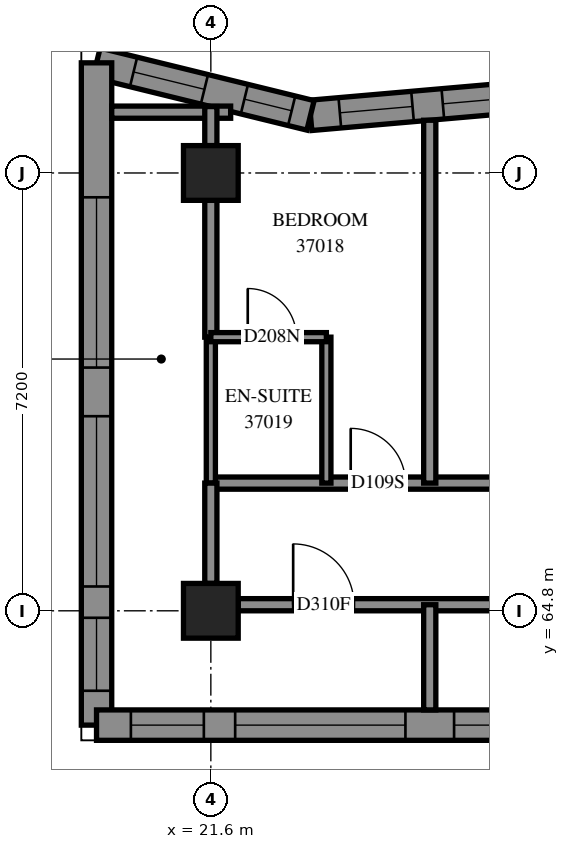
"""IFC4 building model, lengths in metres.
Left out: names, types, materials, properties, quantities, classifications, styles, units other than length and angle.
Written with IfcOpenShell. Run it as: python <this file> out.ifc"""

import sys

from ifc_helpers import new_model, si_unit, direction, frame, frame_2d, origin, origin_2d, place, context, subcontext, project, spatial, polyline, rectangle, outline, extrude, element, fill, save


model = new_model("IFC4")
c1 = context("Model", 3, precision=1e-05, world=origin(), true_north=direction((0.0, 1.0)))
c2 = subcontext(c1, "Body", "Model", "MODEL_VIEW")
j1 = project(units=[si_unit("LENGTHUNIT", "METRE"), si_unit("PLANEANGLEUNIT", "RADIAN")], contexts=[c1])
p1 = place(None, origin())
s1 = spatial("IfcSite", under=j1, at=p1, CompositionType="ELEMENT")
p2 = place(p1, origin())
s2 = spatial("IfcBuilding", under=s1, at=p2, CompositionType="ELEMENT")
p3 = place(p2, frame((0.0, 0.0, 138.8)))
s3 = spatial("IfcBuildingStorey", under=s2, at=p3, CompositionType="ELEMENT", Elevation=138.8)
for number, where, z_axis, x_axis in (
    (1, (21.6, 64.8, 0.0), (0.0, 0.0, 1.0), (1.0, 0.0, 0.0)),
    (2, (21.6, 72.0, 0.0), (0.0, 0.0, 1.0), (1.0, 0.0, 0.0)),
):
    element("IfcColumn", number, at=place(p3, frame(where, z_axis=z_axis, x_axis=x_axis)), inside=s3, PredefinedType="COLUMN", context=c2, shape_type="SweptSolid", body=[
        extrude(rectangle(XDim=0.9, YDim=0.9, at=origin_2d()), origin(), (0.0, 0.0, 1.0), 3.1),
    ])
p4 = place(p3, frame((27.047, 73.279, 0.0), z_axis=(0.0, 0.0, 1.0), x_axis=(-0.9962271263, -0.0867842891, 0.0)))
e3 = element("IfcWall", 3, at=p4, inside=s3, PredefinedType="SOLIDWALL", context=c2, shape_type="SweptSolid", body=[
    extrude(outline(polyline([(-0.022, -0.25), (3.781, -0.25), (3.864, 0.25), (0.022, 0.25), (-0.022, -0.25)])), origin(), (0.0, 0.0, 1.0), 3.1),
])
p5 = place(p4, frame((0.438, 0.0, 0.45)))
e4 = element("IfcOpeningElement", 4, at=p5, cuts=e3, PredefinedType="OPENING", context=c2, shape_type="SweptSolid", body=[
    extrude(rectangle(XDim=1.2, YDim=2.5, at=frame_2d((0.6, 1.25))), frame((0.0, 0.26, 0.0), z_axis=(0.0, -1.0, 0.0), x_axis=(1.0, 0.0, 0.0)), (0.0, 0.0, 1.0), 0.52),
])
p6 = place(p4, frame((2.138, 0.0, 0.45)))
e5 = element("IfcOpeningElement", 5, at=p6, cuts=e3, PredefinedType="OPENING", context=c2, shape_type="SweptSolid", body=[
    extrude(rectangle(XDim=1.2, YDim=2.5, at=frame_2d((0.6, 1.25))), frame((0.0, 0.26, 0.0), z_axis=(0.0, -1.0, 0.0), x_axis=(1.0, 0.0, 0.0)), (0.0, 0.0, 1.0), 0.52),
])
p7 = place(p3, frame((23.239, 72.947, 0.0), z_axis=(0.0, 0.0, 1.0), x_axis=(-0.9711662492, 0.2384032642, 0.0)))
e6 = element("IfcWall", 6, at=p7, inside=s3, PredefinedType="SOLIDWALL", context=c2, shape_type="SweptSolid", body=[
    extrude(outline(polyline([(0.041, -0.25), (3.942, -0.25), (3.304, 0.25), (-0.041, 0.25), (0.041, -0.25)])), origin(), (0.0, 0.0, 1.0), 3.1),
])
p8 = place(p7, frame((1.796, 0.0, 0.45)))
e7 = element("IfcOpeningElement", 7, at=p8, cuts=e6, PredefinedType="OPENING", context=c2, shape_type="SweptSolid", body=[
    extrude(rectangle(XDim=1.2, YDim=2.5, at=frame_2d((0.6, 1.25))), frame((0.0, 0.26, 0.0), z_axis=(0.0, -1.0, 0.0), x_axis=(1.0, 0.0, 0.0)), (0.0, 0.0, 1.0), 0.52),
])
p9 = place(p7, frame((0.319, 0.0, 0.45)))
e8 = element("IfcOpeningElement", 8, at=p9, cuts=e6, PredefinedType="OPENING", context=c2, shape_type="SweptSolid", body=[
    extrude(rectangle(XDim=0.8, YDim=2.5, at=frame_2d((0.4, 1.25))), frame((0.0, 0.26, 0.0), z_axis=(0.0, -1.0, 0.0), x_axis=(1.0, 0.0, 0.0)), (0.0, 0.0, 1.0), 0.52),
])
p10 = place(p3, frame((19.72, 73.811, 0.0), z_axis=(0.0, 0.0, 1.0), x_axis=(0.0, -1.0, 0.0)))
e9 = element("IfcWall", 9, at=p10, inside=s3, PredefinedType="SOLIDWALL", context=c2, shape_type="SweptSolid", body=[
    extrude(outline(polyline([(-0.319, -0.25), (11.141, -0.25), (10.641, 0.25), (0.319, 0.25), (-0.319, -0.25)])), origin(), (0.0, 0.0, 1.0), 3.1),
])
p11 = place(p10, frame((2.211, 0.0, 0.45)))
e10 = element("IfcOpeningElement", 10, at=p11, cuts=e9, PredefinedType="OPENING", context=c2, shape_type="SweptSolid", body=[
    extrude(rectangle(XDim=2.8, YDim=2.5, at=frame_2d((1.4, 1.25))), frame((0.0, 0.26, 0.0), z_axis=(0.0, -1.0, 0.0), x_axis=(1.0, 0.0, 0.0)), (0.0, 0.0, 1.0), 0.52),
])
p12 = place(p10, frame((5.811, 0.0, 0.45)))
e11 = element("IfcOpeningElement", 11, at=p12, cuts=e9, PredefinedType="OPENING", context=c2, shape_type="SweptSolid", body=[
    extrude(rectangle(XDim=2.8, YDim=2.5, at=frame_2d((1.4, 1.25))), frame((0.0, 0.26, 0.0), z_axis=(0.0, -1.0, 0.0), x_axis=(1.0, 0.0, 0.0)), (0.0, 0.0, 1.0), 0.52),
])
p13 = place(p10, frame((9.126, 0.0, 0.45)))
e12 = element("IfcOpeningElement", 12, at=p13, cuts=e9, PredefinedType="OPENING", context=c2, shape_type="SweptSolid", body=[
    extrude(rectangle(XDim=1.2, YDim=2.5, at=frame_2d((0.6, 1.25))), frame((0.0, 0.26, 0.0), z_axis=(0.0, -1.0, 0.0), x_axis=(1.0, 0.0, 0.0)), (0.0, 0.0, 1.0), 0.52),
])
p14 = place(p3, frame((19.72, 62.92, 0.0), z_axis=(0.0, 0.0, 1.0), x_axis=(1.0, 0.0, 0.0)))
e13 = element("IfcWall", 13, at=p14, inside=s3, PredefinedType="SOLIDWALL", context=c2, shape_type="SweptSolid", body=[
    extrude(outline(polyline([(-0.25, -0.25), (15.08, -0.25), (15.58, 0.25), (0.25, 0.25), (-0.25, -0.25)])), origin(), (0.0, 0.0, 1.0), 3.1),
])
p15 = place(p14, frame((2.28, 0.0, 0.45)))
e14 = element("IfcOpeningElement", 14, at=p15, cuts=e13, PredefinedType="OPENING", context=c2, shape_type="SweptSolid", body=[
    extrude(rectangle(XDim=2.8, YDim=2.5, at=frame_2d((1.4, 1.25))), frame((0.0, 0.26, 0.0), z_axis=(0.0, -1.0, 0.0), x_axis=(1.0, 0.0, 0.0)), (0.0, 0.0, 1.0), 0.52),
])
p16 = place(p14, frame((5.88, 0.0, 0.45)))
e15 = element("IfcOpeningElement", 15, at=p16, cuts=e13, PredefinedType="OPENING", context=c2, shape_type="SweptSolid", body=[
    extrude(rectangle(XDim=2.8, YDim=2.5, at=frame_2d((1.4, 1.25))), frame((0.0, 0.26, 0.0), z_axis=(0.0, -1.0, 0.0), x_axis=(1.0, 0.0, 0.0)), (0.0, 0.0, 1.0), 0.52),
])
p17 = place(p14, frame((9.23, 0.0, 0.45)))
e16 = element("IfcOpeningElement", 16, at=p17, cuts=e13, PredefinedType="OPENING", context=c2, shape_type="SweptSolid", body=[
    extrude(rectangle(XDim=2.8, YDim=2.5, at=frame_2d((1.4, 1.25))), frame((0.0, 0.26, 0.0), z_axis=(0.0, -1.0, 0.0), x_axis=(1.0, 0.0, 0.0)), (0.0, 0.0, 1.0), 0.52),
])
p18 = place(p14, frame((0.565, 0.0, 0.45)))
e17 = element("IfcOpeningElement", 17, at=p18, cuts=e13, PredefinedType="OPENING", context=c2, shape_type="SweptSolid", body=[
    extrude(rectangle(XDim=1.2, YDim=2.5, at=frame_2d((0.6, 1.25))), frame((0.0, 0.26, 0.0), z_axis=(0.0, -1.0, 0.0), x_axis=(1.0, 0.0, 0.0)), (0.0, 0.0, 1.0), 0.52),
])
p19 = place(p14, frame((13.305, 0.0, 0.45)))
e18 = element("IfcOpeningElement", 18, at=p19, cuts=e13, PredefinedType="OPENING", context=c2, shape_type="SweptSolid", body=[
    extrude(rectangle(XDim=1.2, YDim=2.5, at=frame_2d((0.6, 1.25))), frame((0.0, 0.26, 0.0), z_axis=(0.0, -1.0, 0.0), x_axis=(1.0, 0.0, 0.0)), (0.0, 0.0, 1.0), 0.52),
])
p20 = place(p3, frame((21.6, 66.9, 0.0), z_axis=(0.0, 0.0, 1.0), x_axis=(1.0, 0.0, 0.0)))
e19 = element("IfcWall", 19, at=p20, inside=s3, PredefinedType="PARTITIONING", context=c2, shape_type="SweptSolid", body=[
    extrude(rectangle(XDim=19.0, YDim=0.2, at=frame_2d((9.5, 0.0))), origin(), (0.0, 0.0, 1.0), 3.1),
])
p21 = place(p20, frame((2.3, 0.0, 0.0)))
e20 = element("IfcOpeningElement", 20, at=p21, cuts=e19, PredefinedType="OPENING", context=c2, shape_type="SweptSolid", body=[
    extrude(rectangle(XDim=0.9, YDim=2.1, at=frame_2d((0.45, 1.05))), frame((0.0, 0.11, 0.0), z_axis=(0.0, -1.0, 0.0), x_axis=(1.0, 0.0, 0.0)), (0.0, 0.0, 1.0), 0.22),
])
p22 = place(p20, frame((5.957, 0.0, 0.0)))
e21 = element("IfcOpeningElement", 21, at=p22, cuts=e19, PredefinedType="OPENING", context=c2, shape_type="SweptSolid", body=[
    extrude(rectangle(XDim=0.9, YDim=2.1, at=frame_2d((0.45, 1.05))), frame((0.0, 0.11, 0.0), z_axis=(0.0, -1.0, 0.0), x_axis=(1.0, 0.0, 0.0)), (0.0, 0.0, 1.0), 0.22),
])
p23 = place(p20, frame((13.057, 0.0, 0.0)))
e22 = element("IfcOpeningElement", 22, at=p23, cuts=e19, PredefinedType="OPENING", context=c2, shape_type="SweptSolid", body=[
    extrude(rectangle(XDim=0.9, YDim=2.1, at=frame_2d((0.45, 1.05))), frame((0.0, 0.11, 0.0), z_axis=(0.0, -1.0, 0.0), x_axis=(1.0, 0.0, 0.0)), (0.0, 0.0, 1.0), 0.22),
])
p24 = place(p3, frame((22.05, 64.9, 0.0), z_axis=(0.0, 0.0, 1.0), x_axis=(1.0, 0.0, 0.0)))
e23 = element("IfcWall", 23, at=p24, inside=s3, PredefinedType="PARTITIONING", context=c2, shape_type="SweptSolid", body=[
    extrude(rectangle(XDim=6.3, YDim=0.2, at=frame_2d((3.15, 0.0))), origin(), (0.0, 0.0, 1.0), 2.6),
])
p25 = place(p24, frame((0.904, 0.0, 0.0)))
e24 = element("IfcOpeningElement", 24, at=p25, cuts=e23, PredefinedType="OPENING", context=c2, shape_type="SweptSolid", body=[
    extrude(rectangle(XDim=1.0, YDim=2.1, at=frame_2d((0.5, 1.05))), frame((0.0, 0.11, 0.0), z_axis=(0.0, -1.0, 0.0), x_axis=(1.0, 0.0, 0.0)), (0.0, 0.0, 1.0), 0.22),
])
p26 = place(p3, frame((25.2, 66.9, 0.0), z_axis=(0.0, 0.0, 1.0), x_axis=(0.0, 1.0, 0.0)))
e25 = element("IfcWall", 25, at=p26, inside=s3, PredefinedType="PARTITIONING", context=c2, shape_type="SweptSolid", body=[
    extrude(rectangle(XDim=5.967, YDim=0.2, at=frame_2d((2.984, 0.0))), origin(), (0.0, 0.0, 1.0), 3.1),
])
p27 = place(p3, frame((21.6, 66.9, 0.0), z_axis=(0.0, 0.0, 1.0), x_axis=(0.0, 1.0, 0.0)))
e26 = element("IfcWall", 26, at=p27, inside=s3, PredefinedType="PARTITIONING", context=c2, shape_type="SweptSolid", body=[
    extrude(rectangle(XDim=2.4, YDim=0.15, at=frame_2d((1.2, 0.0))), origin(), (0.0, 0.0, 1.0), 2.6),
])
p28 = place(p3, frame((23.5, 66.9, 0.0), z_axis=(0.0, 0.0, 1.0), x_axis=(0.0, 1.0, 0.0)))
e27 = element("IfcWall", 27, at=p28, inside=s3, PredefinedType="PARTITIONING", context=c2, shape_type="SweptSolid", body=[
    extrude(rectangle(XDim=2.4, YDim=0.15, at=frame_2d((1.2, 0.0))), origin(), (0.0, 0.0, 1.0), 3.1),
])
p29 = place(p3, frame((21.6, 69.3, 0.0), z_axis=(0.0, 0.0, 1.0), x_axis=(0.0, 1.0, 0.0)))
e28 = element("IfcWall", 28, at=p29, inside=s3, PredefinedType="PARTITIONING", context=c2, shape_type="SweptSolid", body=[
    extrude(rectangle(XDim=2.25, YDim=0.2, at=frame_2d((1.125, 0.0))), origin(), (0.0, 0.0, 1.0), 2.6),
])
p30 = place(p3, frame((19.97, 73.0, 0.0), z_axis=(0.0, 0.0, 1.0), x_axis=(1.0, 0.0, 0.0)))
e29 = element("IfcWall", 29, at=p30, inside=s3, PredefinedType="PARTITIONING", context=c2, shape_type="SweptSolid", body=[
    extrude(rectangle(XDim=1.956, YDim=0.2, at=frame_2d((0.978, 0.0))), origin(), (0.0, 0.0, 1.0), 3.1),
])
p31 = place(p3, frame((21.6, 69.3, 0.0), z_axis=(0.0, 0.0, 1.0), x_axis=(1.0, 0.0, 0.0)))
e30 = element("IfcWall", 30, at=p31, inside=s3, PredefinedType="PARTITIONING", context=c2, shape_type="SweptSolid", body=[
    extrude(rectangle(XDim=1.9, YDim=0.15, at=frame_2d((0.95, 0.0))), origin(), (0.0, 0.0, 1.0), 3.1),
])
p32 = place(p31, frame((0.607, 0.0, 0.0)))
e31 = element("IfcOpeningElement", 31, at=p32, cuts=e30, PredefinedType="OPENING", context=c2, shape_type="SweptSolid", body=[
    extrude(rectangle(XDim=0.8, YDim=2.1, at=frame_2d((0.4, 1.05))), frame((0.0, 0.085, 0.0), z_axis=(0.0, -1.0, 0.0), x_axis=(1.0, 0.0, 0.0)), (0.0, 0.0, 1.0), 0.17),
])
p33 = place(p3, frame((25.2, 63.17, 0.0), z_axis=(0.0, 0.0, 1.0), x_axis=(0.0, 1.0, 0.0)))
e32 = element("IfcWall", 32, at=p33, inside=s3, PredefinedType="PARTITIONING", context=c2, shape_type="SweptSolid", body=[
    extrude(rectangle(XDim=1.73, YDim=0.2, at=frame_2d((0.865, 0.0))), origin(), (0.0, 0.0, 1.0), 3.1),
])
p34 = place(p3, frame((21.6, 65.25, 0.0), z_axis=(0.0, 0.0, 1.0), x_axis=(0.0, 1.0, 0.0)))
e33 = element("IfcWall", 33, at=p34, inside=s3, PredefinedType="PARTITIONING", context=c2, shape_type="SweptSolid", body=[
    extrude(rectangle(XDim=1.65, YDim=0.2, at=frame_2d((0.825, 0.0))), origin(), (0.0, 0.0, 1.0), 2.6),
])
p35 = place(p3, frame((21.6, 72.45, 0.0), z_axis=(0.0, 0.0, 1.0), x_axis=(0.0, 1.0, 0.0)))
e34 = element("IfcWall", 34, at=p35, inside=s3, PredefinedType="PARTITIONING", context=c2, shape_type="SweptSolid", body=[
    extrude(rectangle(XDim=0.642, YDim=0.2, at=frame_2d((0.321, 0.0))), origin(), (0.0, 0.0, 1.0), 3.1),
])
p36 = place(p5, origin())
e35 = element("IfcWindow", 35, at=p36, inside=s3, PartitioningType="SINGLE_PANEL", PredefinedType="WINDOW", context=c2, shape_type="SweptSolid", body=[
    extrude(rectangle(XDim=1.2, YDim=2.5, at=frame_2d((0.6, 1.25))), frame((0.0, 0.18, 0.0), z_axis=(0.0, -1.0, 0.0), x_axis=(1.0, 0.0, 0.0)), (0.0, 0.0, 1.0), 0.06),
])
fill(e4, e35)
p37 = place(p6, origin())
e36 = element("IfcWindow", 36, at=p37, inside=s3, PartitioningType="SINGLE_PANEL", PredefinedType="WINDOW", context=c2, shape_type="SweptSolid", body=[
    extrude(rectangle(XDim=1.2, YDim=2.5, at=frame_2d((0.6, 1.25))), frame((0.0, 0.18, 0.0), z_axis=(0.0, -1.0, 0.0), x_axis=(1.0, 0.0, 0.0)), (0.0, 0.0, 1.0), 0.06),
])
fill(e5, e36)
p38 = place(p8, origin())
e37 = element("IfcWindow", 37, at=p38, inside=s3, PartitioningType="SINGLE_PANEL", PredefinedType="WINDOW", context=c2, shape_type="SweptSolid", body=[
    extrude(rectangle(XDim=1.2, YDim=2.5, at=frame_2d((0.6, 1.25))), frame((0.0, 0.18, 0.0), z_axis=(0.0, -1.0, 0.0), x_axis=(1.0, 0.0, 0.0)), (0.0, 0.0, 1.0), 0.06),
])
fill(e7, e37)
p39 = place(p11, origin())
e38 = element("IfcWindow", 38, at=p39, inside=s3, PartitioningType="SINGLE_PANEL", PredefinedType="WINDOW", context=c2, shape_type="SweptSolid", body=[
    extrude(rectangle(XDim=2.8, YDim=2.5, at=frame_2d((1.4, 1.25))), frame((0.0, 0.18, 0.0), z_axis=(0.0, -1.0, 0.0), x_axis=(1.0, 0.0, 0.0)), (0.0, 0.0, 1.0), 0.06),
])
fill(e10, e38)
p40 = place(p12, origin())
e39 = element("IfcWindow", 39, at=p40, inside=s3, PartitioningType="SINGLE_PANEL", PredefinedType="WINDOW", context=c2, shape_type="SweptSolid", body=[
    extrude(rectangle(XDim=2.8, YDim=2.5, at=frame_2d((1.4, 1.25))), frame((0.0, 0.18, 0.0), z_axis=(0.0, -1.0, 0.0), x_axis=(1.0, 0.0, 0.0)), (0.0, 0.0, 1.0), 0.06),
])
fill(e11, e39)
p41 = place(p13, origin())
e40 = element("IfcWindow", 40, at=p41, inside=s3, PartitioningType="SINGLE_PANEL", PredefinedType="WINDOW", context=c2, shape_type="SweptSolid", body=[
    extrude(rectangle(XDim=1.2, YDim=2.5, at=frame_2d((0.6, 1.25))), frame((0.0, 0.18, 0.0), z_axis=(0.0, -1.0, 0.0), x_axis=(1.0, 0.0, 0.0)), (0.0, 0.0, 1.0), 0.06),
])
fill(e12, e40)
p42 = place(p15, origin())
e41 = element("IfcWindow", 41, at=p42, inside=s3, PartitioningType="SINGLE_PANEL", PredefinedType="WINDOW", context=c2, shape_type="SweptSolid", body=[
    extrude(rectangle(XDim=2.8, YDim=2.5, at=frame_2d((1.4, 1.25))), frame((0.0, 0.18, 0.0), z_axis=(0.0, -1.0, 0.0), x_axis=(1.0, 0.0, 0.0)), (0.0, 0.0, 1.0), 0.06),
])
fill(e14, e41)
p43 = place(p16, origin())
e42 = element("IfcWindow", 42, at=p43, inside=s3, PartitioningType="SINGLE_PANEL", PredefinedType="WINDOW", context=c2, shape_type="SweptSolid", body=[
    extrude(rectangle(XDim=2.8, YDim=2.5, at=frame_2d((1.4, 1.25))), frame((0.0, 0.18, 0.0), z_axis=(0.0, -1.0, 0.0), x_axis=(1.0, 0.0, 0.0)), (0.0, 0.0, 1.0), 0.06),
])
fill(e15, e42)
p44 = place(p18, origin())
e43 = element("IfcWindow", 43, at=p44, inside=s3, PartitioningType="SINGLE_PANEL", PredefinedType="WINDOW", context=c2, shape_type="SweptSolid", body=[
    extrude(rectangle(XDim=1.2, YDim=2.5, at=frame_2d((0.6, 1.25))), frame((0.0, 0.18, 0.0), z_axis=(0.0, -1.0, 0.0), x_axis=(1.0, 0.0, 0.0)), (0.0, 0.0, 1.0), 0.06),
])
fill(e17, e43)
p45 = place(p25, origin())
e44 = element("IfcDoor", 44, at=p45, inside=s3, OperationType="SINGLE_SWING_RIGHT", PredefinedType="DOOR", context=c2, shape_type="SweptSolid", body=[
    extrude(rectangle(XDim=1.0, YDim=2.1, at=frame_2d((0.5, 1.05))), frame((0.0, 0.025, 0.0), z_axis=(0.0, -1.0, 0.0), x_axis=(1.0, 0.0, 0.0)), (0.0, 0.0, 1.0), 0.05),
])
fill(e24, e44)
p46 = place(p21, origin())
e45 = element("IfcDoor", 45, at=p46, inside=s3, OperationType="SINGLE_SWING_RIGHT", PredefinedType="DOOR", context=c2, shape_type="SweptSolid", body=[
    extrude(rectangle(XDim=0.9, YDim=2.1, at=frame_2d((0.45, 1.05))), frame((0.0, 0.025, 0.0), z_axis=(0.0, -1.0, 0.0), x_axis=(1.0, 0.0, 0.0)), (0.0, 0.0, 1.0), 0.05),
])
fill(e20, e45)
p47 = place(p32, origin())
e46 = element("IfcDoor", 46, at=p47, inside=s3, OperationType="SINGLE_SWING_RIGHT", PredefinedType="DOOR", context=c2, shape_type="SweptSolid", body=[
    extrude(rectangle(XDim=0.8, YDim=2.1, at=frame_2d((0.4, 1.05))), frame((0.0, 0.025, 0.0), z_axis=(0.0, -1.0, 0.0), x_axis=(1.0, 0.0, 0.0)), (0.0, 0.0, 1.0), 0.05),
])
fill(e31, e46)
p48 = place(p9, origin())
e47 = element("IfcWindow", 47, at=p48, inside=s3, PartitioningType="SINGLE_PANEL", PredefinedType="WINDOW", context=c2, shape_type="SweptSolid", body=[
    extrude(rectangle(XDim=0.8, YDim=2.5, at=frame_2d((0.4, 1.25))), frame((0.0, 0.18, 0.0), z_axis=(0.0, -1.0, 0.0), x_axis=(1.0, 0.0, 0.0)), (0.0, 0.0, 1.0), 0.06),
])
fill(e8, e47)
save(model, sys.argv[1])
